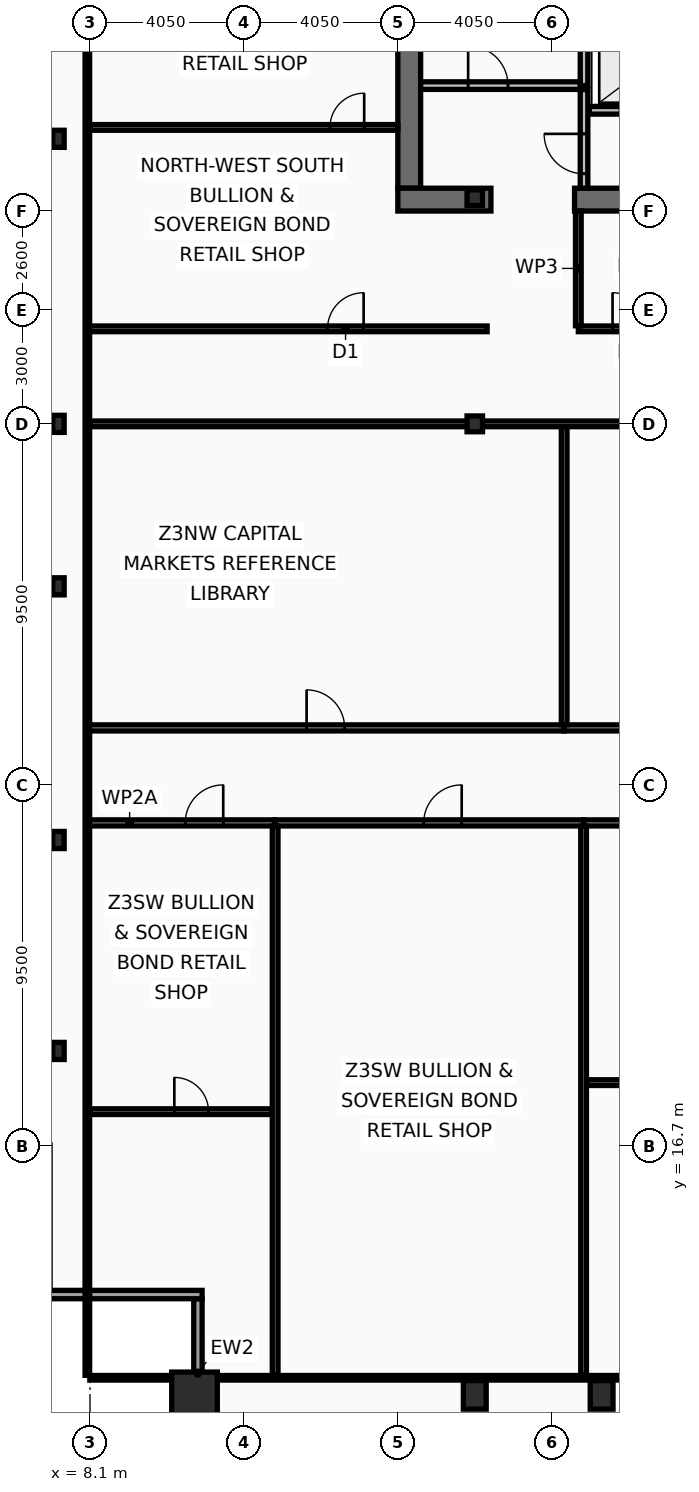
"""IFC4 building model, lengths in metres.
Left out: names, types, materials, properties, quantities, classifications, styles, units other than length and angle.
Written with IfcOpenShell. Run it as: python <this file> out.ifc"""

import sys

from ifc_helpers import new_model, si_unit, direction, frame, frame_2d, origin, origin_2d, place, context, subcontext, project, spatial, rectangle, hollow_rectangle, i_section, extrude, element, fill, save


model = new_model("IFC4")
c1 = context("Model", 3, precision=1e-05, world=origin(), true_north=direction((0.0, 1.0)))
c2 = subcontext(c1, "Body", "Model", "MODEL_VIEW")
j1 = project(units=[si_unit("LENGTHUNIT", "METRE"), si_unit("PLANEANGLEUNIT", "RADIAN")], contexts=[c1])
p1 = place(None, origin())
s1 = spatial("IfcSite", under=j1, at=p1, CompositionType="ELEMENT")
p2 = place(p1, origin())
s2 = spatial("IfcBuilding", under=s1, at=p2, CompositionType="ELEMENT")
p3 = place(p2, frame((0.0, 0.0, 195.8)))
s3 = spatial("IfcBuildingStorey", under=s2, at=p3, CompositionType="ELEMENT", Elevation=195.8)
p4 = place(p3, frame((16.5, 41.9, 0.0), z_axis=(0.0, 0.0, 1.0), x_axis=(0.0, 1.0, 0.0)))
e1 = element("IfcWall", 1, at=p4, inside=s3, PredefinedType="SHEAR", context=c2, shape_type="SweptSolid", body=[
    extrude(rectangle(XDim=11.2, YDim=0.6, at=frame_2d((5.6, 0.0))), origin(), (0.0, 0.0, 1.0), 3.44),
])
p5 = place(p3, frame((18.65, 41.6, 0.0), z_axis=(0.0, 0.0, 1.0), x_axis=(-1.0, 0.0, 0.0)))
e2 = element("IfcWall", 2, at=p5, inside=s3, PredefinedType="SHEAR", context=c2, shape_type="SweptSolid", body=[
    extrude(rectangle(XDim=2.45, YDim=0.6, at=frame_2d((1.225, 0.0))), origin(), (0.0, 0.0, 1.0), 3.44),
])
p6 = place(p3, frame((32.3, 41.6, 0.0), z_axis=(0.0, 0.0, 1.0), x_axis=(-1.0, 0.0, 0.0)))
e3 = element("IfcWall", 3, at=p6, inside=s3, PredefinedType="SHEAR", context=c2, shape_type="SweptSolid", body=[
    extrude(rectangle(XDim=11.45, YDim=0.6, at=frame_2d((5.725, 0.0))), origin(), (0.0, 0.0, 1.0), 3.44),
])
p7 = place(p3, frame((10.85, 10.15, 0.0), z_axis=(0.0, 0.0, 1.0), x_axis=(1.0, 0.0, 0.0)))
e4 = element("IfcColumn", 4, at=p7, inside=s3, PredefinedType="COLUMN", context=c2, shape_type="SweptSolid", body=[
    extrude(hollow_rectangle(XDim=1.2, YDim=1.2, WallThickness=0.06, at=origin_2d()), origin(), (0.0, 0.0, 1.0), 3.6),
])
for number, where, z_axis, x_axis in (
    (5, (18.225, 10.15, 0.0), (0.0, 0.0, 1.0), (1.0, 0.0, 0.0)),
    (6, (21.562, 10.15, 0.0), (0.0, 0.0, 1.0), (1.0, 0.0, 0.0)),
):
    element("IfcColumn", number, at=place(p3, frame(where, z_axis=z_axis, x_axis=x_axis)), inside=s3, PredefinedType="COLUMN", context=c2, shape_type="SweptSolid", body=[
        extrude(hollow_rectangle(XDim=0.6, YDim=0.75, WallThickness=0.045, at=origin_2d()), origin(), (0.0, 0.0, 1.0), 3.6),
    ])
for number, where, z_axis, x_axis in (
    (7, (7.27, 19.2, 0.0), (0.0, 0.0, 1.0), (1.0, 0.0, 0.0)),
    (8, (7.27, 24.75, 0.0), (0.0, 0.0, 1.0), (1.0, 0.0, 0.0)),
    (9, (7.27, 31.425, 0.0), (0.0, 0.0, 1.0), (1.0, 0.0, 0.0)),
    (10, (7.27, 35.7, 0.0), (0.0, 0.0, 1.0), (1.0, 0.0, 0.0)),
    (11, (7.27, 43.2, 0.0), (0.0, 0.0, 1.0), (1.0, 0.0, 0.0)),
):
    element("IfcColumn", number, at=place(p3, frame(where, z_axis=z_axis, x_axis=x_axis)), inside=s3, PredefinedType="COLUMN", context=c2, shape_type="SweptSolid", body=[
        extrude(i_section(OverallWidth=0.3, OverallDepth=0.45, WebThickness=0.014, FlangeThickness=0.026, at=origin_2d()), origin(), (0.0, 0.0, 1.0), 3.6),
    ])
for number, where, z_axis, x_axis in (
    (12, (18.225, 35.7, 0.0), (0.0, 0.0, 1.0), (1.0, 0.0, 0.0)),
    (13, (18.225, 41.65, 0.0), (0.0, 0.0, 1.0), (1.0, 0.0, 0.0)),
):
    element("IfcColumn", number, at=place(p3, frame(where, z_axis=z_axis, x_axis=x_axis)), inside=s3, PredefinedType="COLUMN", context=c2, shape_type="SweptSolid", body=[
        extrude(i_section(OverallWidth=0.406, OverallDepth=0.416, WebThickness=0.03, FlangeThickness=0.048, at=origin_2d()), origin(), (0.0, 0.0, 1.0), 3.6),
    ])
p8 = place(p3, frame((10.94, 8.77, 0.0), z_axis=(0.0, 0.0, 1.0), x_axis=(0.0, 1.0, 0.0)))
e14 = element("IfcWall", 14, at=p8, inside=s3, PredefinedType="SOLIDWALL", context=c2, shape_type="SweptSolid", body=[
    extrude(rectangle(XDim=3.91, YDim=0.22, at=frame_2d((1.955, 0.0))), origin(), (0.0, 0.0, 1.0), 2.83),
])
p9 = place(p3, frame((11.05, 12.79, 0.0), z_axis=(0.0, 0.0, 1.0), x_axis=(-1.0, 0.0, 0.0)))
e15 = element("IfcWall", 15, at=p9, inside=s3, PredefinedType="SOLIDWALL", context=c2, shape_type="SweptSolid", body=[
    extrude(rectangle(XDim=4.22, YDim=0.22, at=frame_2d((2.11, 0.0))), origin(), (0.0, 0.0, 1.0), 2.83),
])
p10 = place(p3, frame((24.21, 43.95, 0.0), z_axis=(0.0, 0.0, 1.0), x_axis=(-1.0, 0.0, 0.0)))
e16 = element("IfcWall", 16, at=p10, inside=s3, PredefinedType="PARTITIONING", context=c2, shape_type="SweptSolid", body=[
    extrude(rectangle(XDim=2.97, YDim=0.2, at=frame_2d((1.485, 0.0))), origin(), (0.0, 0.0, 1.0), 3.44),
])
p11 = place(p10, frame((0.86, 0.0, 0.0)))
e17 = element("IfcOpeningElement", 17, at=p11, cuts=e16, PredefinedType="OPENING", context=c2, shape_type="SweptSolid", body=[
    extrude(rectangle(XDim=1.3, YDim=2.18, at=frame_2d((0.65, 1.09))), frame((0.0, 0.11, 0.0), z_axis=(0.0, -1.0, 0.0), x_axis=(1.0, 0.0, 0.0)), (0.0, 0.0, 1.0), 0.22),
])
p12 = place(p3, frame((21.1, 44.6, 0.0), z_axis=(0.0, 0.0, 1.0), x_axis=(0.0, 1.0, 0.0)))
e18 = element("IfcWall", 18, at=p12, inside=s3, PredefinedType="PARTITIONING", context=c2, shape_type="SweptSolid", body=[
    extrude(rectangle(XDim=4.3, YDim=0.2, at=frame_2d((2.15, 0.0))), origin(), (0.0, 0.0, 1.0), 3.44),
])
p13 = place(p3, frame((16.8, 44.6, 0.0), z_axis=(0.0, 0.0, 1.0), x_axis=(1.0, 0.0, 0.0)))
e19 = element("IfcWall", 19, at=p13, inside=s3, PredefinedType="PARTITIONING", context=c2, shape_type="SweptSolid", body=[
    extrude(rectangle(XDim=4.2, YDim=0.2, at=frame_2d((2.1, 0.0))), origin(), (0.0, 0.0, 1.0), 3.44),
])
p14 = place(p13, frame((1.25, 0.0, 0.0)))
e20 = element("IfcOpeningElement", 20, at=p14, cuts=e19, PredefinedType="OPENING", context=c2, shape_type="SweptSolid", body=[
    extrude(rectangle(XDim=1.05, YDim=2.15, at=frame_2d((0.525, 1.075))), frame((0.0, 0.11, 0.0), z_axis=(0.0, -1.0, 0.0), x_axis=(1.0, 0.0, 0.0)), (0.0, 0.0, 1.0), 0.22),
])
p15 = place(p3, frame((21.1, 41.9, 0.0), z_axis=(0.0, 0.0, 1.0), x_axis=(0.0, 1.0, 0.0)))
e21 = element("IfcWall", 21, at=p15, inside=s3, PredefinedType="PARTITIONING", context=c2, shape_type="SweptSolid", body=[
    extrude(rectangle(XDim=2.595, YDim=0.2, at=frame_2d((1.298, 0.0))), origin(), (0.0, 0.0, 1.0), 3.44),
])
p16 = place(p15, frame((0.38, 0.0, 0.0)))
e22 = element("IfcOpeningElement", 22, at=p16, cuts=e21, PredefinedType="OPENING", context=c2, shape_type="SweptSolid", body=[
    extrude(rectangle(XDim=1.05, YDim=2.15, at=frame_2d((0.525, 1.075))), frame((0.0, 0.11, 0.0), z_axis=(0.0, -1.0, 0.0), x_axis=(1.0, 0.0, 0.0)), (0.0, 0.0, 1.0), 0.22),
])
p17 = place(p3, frame((20.95, 38.2, 0.0), z_axis=(0.0, 0.0, 1.0), x_axis=(1.0, 0.0, 0.0)))
e23 = element("IfcWall", 23, at=p17, inside=s3, PredefinedType="PARTITIONING", context=c2, shape_type="SweptSolid", body=[
    extrude(rectangle(XDim=3.35, YDim=0.15, at=frame_2d((1.675, 0.0))), origin(), (0.0, 0.0, 1.0), 3.44),
])
p18 = place(p17, frame((0.9, 0.0, 0.0)))
e24 = element("IfcOpeningElement", 24, at=p18, cuts=e23, PredefinedType="OPENING", context=c2, shape_type="SweptSolid", body=[
    extrude(rectangle(XDim=0.95, YDim=2.05, at=frame_2d((0.475, 1.025))), frame((0.0, 0.085, 0.0), z_axis=(0.0, -1.0, 0.0), x_axis=(1.0, 0.0, 0.0)), (0.0, 0.0, 1.0), 0.17),
])
p19 = place(p3, frame((20.95, 38.28, 0.0), z_axis=(0.0, 0.0, 1.0), x_axis=(0.0, 1.0, 0.0)))
e25 = element("IfcWall", 25, at=p19, inside=s3, PredefinedType="PARTITIONING", context=c2, shape_type="SweptSolid", body=[
    extrude(rectangle(XDim=3.02, YDim=0.15, at=frame_2d((1.51, 0.0))), origin(), (0.0, 0.0, 1.0), 3.44),
])
p20 = place(p3, frame((8.03, 38.2, 0.0), z_axis=(0.0, 0.0, 1.0), x_axis=(1.0, 0.0, 0.0)))
e26 = element("IfcWall", 26, at=p20, inside=s3, PredefinedType="PARTITIONING", context=c2, shape_type="SweptSolid", body=[
    extrude(rectangle(XDim=10.52, YDim=0.15, at=frame_2d((5.26, 0.0))), origin(), (0.0, 0.0, 1.0), 2.73),
])
p21 = place(p20, frame((6.32, 0.0, 0.0)))
e27 = element("IfcOpeningElement", 27, at=p21, cuts=e26, PredefinedType="OPENING", context=c2, shape_type="SweptSolid", body=[
    extrude(rectangle(XDim=0.95, YDim=2.05, at=frame_2d((0.475, 1.025))), frame((0.0, 0.085, 0.0), z_axis=(0.0, -1.0, 0.0), x_axis=(1.0, 0.0, 0.0)), (0.0, 0.0, 1.0), 0.17),
])
p22 = place(p3, frame((8.095, 43.5, 0.0), z_axis=(0.0, 0.0, 1.0), x_axis=(1.0, 0.0, 0.0)))
e28 = element("IfcWall", 28, at=p22, inside=s3, PredefinedType="PARTITIONING", context=c2, shape_type="SweptSolid", body=[
    extrude(rectangle(XDim=8.105, YDim=0.15, at=frame_2d((4.052, 0.0))), origin(), (0.0, 0.0, 1.0), 2.73),
])
p23 = place(p22, frame((6.32, 0.0, 0.0)))
e29 = element("IfcOpeningElement", 29, at=p23, cuts=e28, PredefinedType="OPENING", context=c2, shape_type="SweptSolid", body=[
    extrude(rectangle(XDim=0.9, YDim=2.05, at=frame_2d((0.45, 1.025))), frame((0.0, 0.085, 0.0), z_axis=(0.0, -1.0, 0.0), x_axis=(1.0, 0.0, 0.0)), (0.0, 0.0, 1.0), 0.17),
])
p24 = place(p3, frame((8.095, 35.7, 0.0), z_axis=(0.0, 0.0, 1.0), x_axis=(1.0, 0.0, 0.0)))
e30 = element("IfcWall", 30, at=p24, inside=s3, PredefinedType="PARTITIONING", context=c2, shape_type="SweptSolid", body=[
    extrude(rectangle(XDim=24.925, YDim=0.15, at=frame_2d((12.462, 0.0))), origin(), (0.0, 0.0, 1.0), 2.73),
])
p25 = place(p3, frame((8.03, 25.2, 0.0), z_axis=(0.0, 0.0, 1.0), x_axis=(1.0, 0.0, 0.0)))
e31 = element("IfcWall", 31, at=p25, inside=s3, PredefinedType="PARTITIONING", context=c2, shape_type="SweptSolid", body=[
    extrude(rectangle(XDim=4.942, YDim=0.16, at=frame_2d((2.471, 0.0))), origin(), (0.0, 0.0, 1.0), 3.44),
])
p26 = place(p25, frame((2.576, 0.0, 0.0)))
e32 = element("IfcOpeningElement", 32, at=p26, cuts=e31, PredefinedType="OPENING", context=c2, shape_type="SweptSolid", body=[
    extrude(rectangle(XDim=1.0, YDim=2.05, at=frame_2d((0.5, 1.025))), frame((0.0, 0.09, 0.0), z_axis=(0.0, -1.0, 0.0), x_axis=(1.0, 0.0, 0.0)), (0.0, 0.0, 1.0), 0.18),
])
p27 = place(p3, frame((8.095, 17.602, 0.0), z_axis=(0.0, 0.0, 1.0), x_axis=(1.0, 0.0, 0.0)))
e33 = element("IfcWall", 33, at=p27, inside=s3, PredefinedType="PARTITIONING", context=c2, shape_type="SweptSolid", body=[
    extrude(rectangle(XDim=4.797, YDim=0.15, at=frame_2d((2.398, 0.0))), origin(), (0.0, 0.0, 1.0), 2.83),
])
p28 = place(p27, frame((2.224, 0.0, 0.0)))
e34 = element("IfcOpeningElement", 34, at=p28, cuts=e33, PredefinedType="OPENING", context=c2, shape_type="SweptSolid", body=[
    extrude(rectangle(XDim=0.9, YDim=2.05, at=frame_2d((0.45, 1.025))), frame((0.0, 0.085, 0.0), z_axis=(0.0, -1.0, 0.0), x_axis=(1.0, 0.0, 0.0)), (0.0, 0.0, 1.0), 0.17),
])
p29 = place(p3, frame((12.972, 25.2, 0.0), z_axis=(0.0, 0.0, 1.0), x_axis=(1.0, 0.0, 0.0)))
e35 = element("IfcWall", 35, at=p29, inside=s3, PredefinedType="PARTITIONING", context=c2, shape_type="SweptSolid", body=[
    extrude(rectangle(XDim=8.116, YDim=0.16, at=frame_2d((4.058, 0.0))), origin(), (0.0, 0.0, 1.0), 2.73),
])
p30 = place(p29, frame((3.909, 0.0, 0.0)))
e36 = element("IfcOpeningElement", 36, at=p30, cuts=e35, PredefinedType="OPENING", context=c2, shape_type="SweptSolid", body=[
    extrude(rectangle(XDim=1.0, YDim=2.05, at=frame_2d((0.5, 1.025))), frame((0.0, 0.09, 0.0), z_axis=(0.0, -1.0, 0.0), x_axis=(1.0, 0.0, 0.0)), (0.0, 0.0, 1.0), 0.18),
])
p31 = place(p3, frame((12.972, 10.665, 0.0), z_axis=(0.0, 0.0, 1.0), x_axis=(0.0, 1.0, 0.0)))
e37 = element("IfcWall", 37, at=p31, inside=s3, PredefinedType="PARTITIONING", context=c2, shape_type="SweptSolid", body=[
    extrude(rectangle(XDim=14.45, YDim=0.15, at=frame_2d((7.225, 0.0))), origin(), (0.0, 0.0, 1.0), 2.73),
])
p32 = place(p3, frame((21.088, 25.2, 0.0), z_axis=(0.0, 0.0, 1.0), x_axis=(1.0, 0.0, 0.0)))
e38 = element("IfcWall", 38, at=p32, inside=s3, PredefinedType="PARTITIONING", context=c2, shape_type="SweptSolid", body=[
    extrude(rectangle(XDim=12.012, YDim=0.16, at=frame_2d((6.006, 0.0))), origin(), (0.0, 0.0, 1.0), 2.73),
])
p33 = place(p32, frame((5.545, 0.0, 0.0)))
e39 = element("IfcOpeningElement", 39, at=p33, cuts=e38, PredefinedType="OPENING", context=c2, shape_type="SweptSolid", body=[
    extrude(rectangle(XDim=1.0, YDim=2.05, at=frame_2d((0.5, 1.025))), frame((0.0, 0.09, 0.0), z_axis=(0.0, -1.0, 0.0), x_axis=(1.0, 0.0, 0.0)), (0.0, 0.0, 1.0), 0.18),
])
p34 = place(p3, frame((21.088, 10.665, 0.0), z_axis=(0.0, 0.0, 1.0), x_axis=(0.0, 1.0, 0.0)))
e40 = element("IfcWall", 40, at=p34, inside=s3, PredefinedType="PARTITIONING", context=c2, shape_type="SweptSolid", body=[
    extrude(rectangle(XDim=14.45, YDim=0.15, at=frame_2d((7.225, 0.0))), origin(), (0.0, 0.0, 1.0), 2.98),
])
p35 = place(p3, frame((21.168, 18.366, 0.0), z_axis=(0.0, 0.0, 1.0), x_axis=(1.0, 0.0, 0.0)))
e41 = element("IfcWall", 41, at=p35, inside=s3, PredefinedType="PARTITIONING", context=c2, shape_type="SweptSolid", body=[
    extrude(rectangle(XDim=11.852, YDim=0.15, at=frame_2d((5.926, 0.0))), origin(), (0.0, 0.0, 1.0), 2.73),
])
p36 = place(p35, frame((5.405, 0.0, 0.0)))
e42 = element("IfcOpeningElement", 42, at=p36, cuts=e41, PredefinedType="OPENING", context=c2, shape_type="SweptSolid", body=[
    extrude(rectangle(XDim=0.9, YDim=2.05, at=frame_2d((0.45, 1.025))), frame((0.0, 0.085, 0.0), z_axis=(0.0, -1.0, 0.0), x_axis=(1.0, 0.0, 0.0)), (0.0, 0.0, 1.0), 0.17),
])
p37 = place(p3, frame((8.03, 27.7, 0.0), z_axis=(0.0, 0.0, 1.0), x_axis=(1.0, 0.0, 0.0)))
e43 = element("IfcWall", 43, at=p37, inside=s3, PredefinedType="PARTITIONING", context=c2, shape_type="SweptSolid", body=[
    extrude(rectangle(XDim=12.547, YDim=0.16, at=frame_2d((6.273, 0.0))), origin(), (0.0, 0.0, 1.0), 2.73),
])
p38 = place(p37, frame((5.77, 0.0, 0.0)))
e44 = element("IfcOpeningElement", 44, at=p38, cuts=e43, PredefinedType="OPENING", context=c2, shape_type="SweptSolid", body=[
    extrude(rectangle(XDim=1.0, YDim=2.05, at=frame_2d((0.5, 1.025))), frame((0.0, 0.09, 0.0), z_axis=(0.0, -1.0, 0.0), x_axis=(1.0, 0.0, 0.0)), (0.0, 0.0, 1.0), 0.18),
])
p39 = place(p3, frame((20.577, 27.7, 0.0), z_axis=(0.0, 0.0, 1.0), x_axis=(1.0, 0.0, 0.0)))
e45 = element("IfcWall", 45, at=p39, inside=s3, PredefinedType="PARTITIONING", context=c2, shape_type="SweptSolid", body=[
    extrude(rectangle(XDim=12.523, YDim=0.16, at=frame_2d((6.261, 0.0))), origin(), (0.0, 0.0, 1.0), 2.73),
])
p40 = place(p39, frame((5.76, 0.0, 0.0)))
e46 = element("IfcOpeningElement", 46, at=p40, cuts=e45, PredefinedType="OPENING", context=c2, shape_type="SweptSolid", body=[
    extrude(rectangle(XDim=1.0, YDim=2.05, at=frame_2d((0.5, 1.025))), frame((0.0, 0.09, 0.0), z_axis=(0.0, -1.0, 0.0), x_axis=(1.0, 0.0, 0.0)), (0.0, 0.0, 1.0), 0.18),
])
p41 = place(p3, frame((20.577, 27.785, 0.0), z_axis=(0.0, 0.0, 1.0), x_axis=(0.0, 1.0, 0.0)))
e47 = element("IfcWall", 47, at=p41, inside=s3, PredefinedType="PARTITIONING", context=c2, shape_type="SweptSolid", body=[
    extrude(rectangle(XDim=7.835, YDim=0.15, at=frame_2d((3.917, 0.0))), origin(), (0.0, 0.0, 1.0), 2.98),
])
p42 = place(p3, frame((8.03, 10.665, 0.0), z_axis=(0.0, 0.0, 1.0), x_axis=(0.0, 1.0, 0.0)))
e48 = element("IfcWall", 48, at=p42, inside=s3, PredefinedType="PARTITIONING", context=c2, shape_type="SweptSolid", body=[
    extrude(rectangle(XDim=42.11, YDim=0.12, at=frame_2d((21.055, 0.0))), origin(), (0.0, 0.0, 1.0), 2.73),
])
p43 = place(p3, frame((8.095, 10.6, 0.0), z_axis=(0.0, 0.0, 1.0), x_axis=(1.0, 0.0, 0.0)))
e49 = element("IfcWall", 49, at=p43, inside=s3, PredefinedType="PARTITIONING", context=c2, shape_type="SweptSolid", body=[
    extrude(rectangle(XDim=56.71, YDim=0.12, at=frame_2d((28.355, 0.0))), origin(), (0.0, 0.0, 1.0), 2.73),
])
p44 = place(p14, origin())
e50 = element("IfcDoor", 50, at=p44, inside=s3, OperationType="SINGLE_SWING_LEFT", PredefinedType="DOOR", context=c2, shape_type="SweptSolid", body=[
    extrude(rectangle(XDim=1.05, YDim=2.15, at=frame_2d((0.525, 1.075))), frame((0.0, 0.025, 0.0), z_axis=(0.0, -1.0, 0.0), x_axis=(1.0, 0.0, 0.0)), (0.0, 0.0, 1.0), 0.05),
])
fill(e20, e50)
p45 = place(p16, origin())
e51 = element("IfcDoor", 51, at=p45, inside=s3, OperationType="SINGLE_SWING_RIGHT", PredefinedType="DOOR", context=c2, shape_type="SweptSolid", body=[
    extrude(rectangle(XDim=1.05, YDim=2.15, at=frame_2d((0.525, 1.075))), frame((0.0, 0.025, 0.0), z_axis=(0.0, -1.0, 0.0), x_axis=(1.0, 0.0, 0.0)), (0.0, 0.0, 1.0), 0.05),
])
fill(e22, e51)
p46 = place(p18, origin())
e52 = element("IfcDoor", 52, at=p46, inside=s3, OperationType="SINGLE_SWING_LEFT", PredefinedType="DOOR", context=c2, shape_type="SweptSolid", body=[
    extrude(rectangle(XDim=0.95, YDim=2.05, at=frame_2d((0.475, 1.025))), frame((0.0, 0.025, 0.0), z_axis=(0.0, -1.0, 0.0), x_axis=(1.0, 0.0, 0.0)), (0.0, 0.0, 1.0), 0.05),
])
fill(e24, e52)
p47 = place(p21, origin())
e53 = element("IfcDoor", 53, at=p47, inside=s3, OperationType="SINGLE_SWING_RIGHT", PredefinedType="DOOR", context=c2, shape_type="SweptSolid", body=[
    extrude(rectangle(XDim=0.95, YDim=2.05, at=frame_2d((0.475, 1.025))), frame((0.0, 0.025, 0.0), z_axis=(0.0, -1.0, 0.0), x_axis=(1.0, 0.0, 0.0)), (0.0, 0.0, 1.0), 0.05),
])
fill(e27, e53)
p48 = place(p23, origin())
e54 = element("IfcDoor", 54, at=p48, inside=s3, OperationType="SINGLE_SWING_RIGHT", PredefinedType="DOOR", context=c2, shape_type="SweptSolid", body=[
    extrude(rectangle(XDim=0.9, YDim=2.05, at=frame_2d((0.45, 1.025))), frame((0.0, 0.025, 0.0), z_axis=(0.0, -1.0, 0.0), x_axis=(1.0, 0.0, 0.0)), (0.0, 0.0, 1.0), 0.05),
])
fill(e29, e54)
p49 = place(p26, origin())
e55 = element("IfcDoor", 55, at=p49, inside=s3, OperationType="SINGLE_SWING_RIGHT", PredefinedType="DOOR", context=c2, shape_type="SweptSolid", body=[
    extrude(rectangle(XDim=1.0, YDim=2.05, at=frame_2d((0.5, 1.025))), frame((0.0, 0.025, 0.0), z_axis=(0.0, -1.0, 0.0), x_axis=(1.0, 0.0, 0.0)), (0.0, 0.0, 1.0), 0.05),
])
fill(e32, e55)
p50 = place(p28, origin())
e56 = element("IfcDoor", 56, at=p50, inside=s3, OperationType="SINGLE_SWING_LEFT", PredefinedType="DOOR", context=c2, shape_type="SweptSolid", body=[
    extrude(rectangle(XDim=0.9, YDim=2.05, at=frame_2d((0.45, 1.025))), frame((0.0, 0.025, 0.0), z_axis=(0.0, -1.0, 0.0), x_axis=(1.0, 0.0, 0.0)), (0.0, 0.0, 1.0), 0.05),
])
fill(e34, e56)
p51 = place(p30, origin())
e57 = element("IfcDoor", 57, at=p51, inside=s3, OperationType="SINGLE_SWING_RIGHT", PredefinedType="DOOR", context=c2, shape_type="SweptSolid", body=[
    extrude(rectangle(XDim=1.0, YDim=2.05, at=frame_2d((0.5, 1.025))), frame((0.0, 0.025, 0.0), z_axis=(0.0, -1.0, 0.0), x_axis=(1.0, 0.0, 0.0)), (0.0, 0.0, 1.0), 0.05),
])
fill(e36, e57)
p52 = place(p38, origin())
e58 = element("IfcDoor", 58, at=p52, inside=s3, OperationType="SINGLE_SWING_LEFT", PredefinedType="DOOR", context=c2, shape_type="SweptSolid", body=[
    extrude(rectangle(XDim=1.0, YDim=2.05, at=frame_2d((0.5, 1.025))), frame((0.0, 0.025, 0.0), z_axis=(0.0, -1.0, 0.0), x_axis=(1.0, 0.0, 0.0)), (0.0, 0.0, 1.0), 0.05),
])
fill(e44, e58)
save(model, sys.argv[1])
